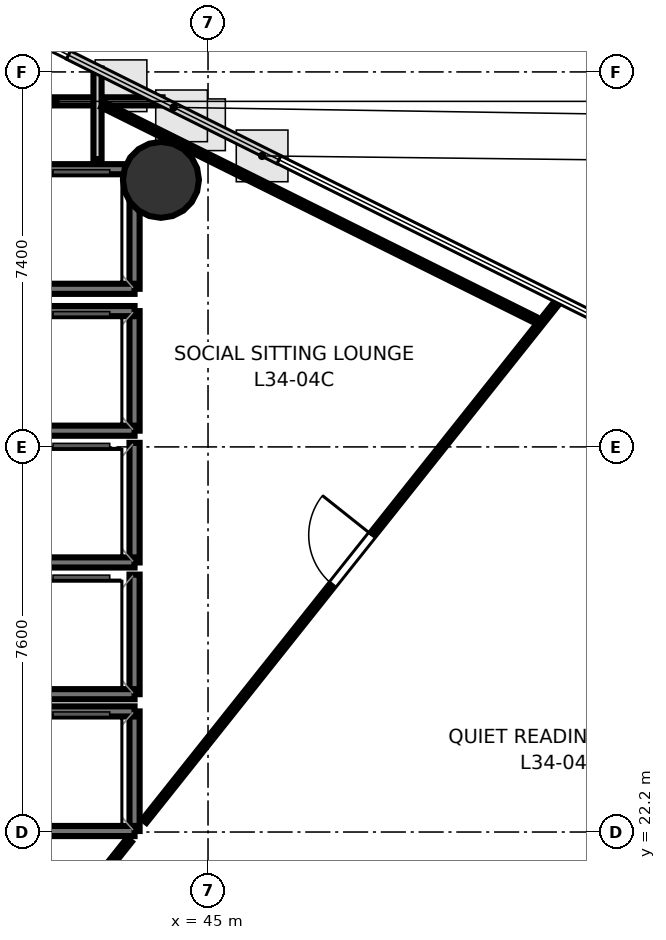
"""IFC4 building model, lengths in metres.
Left out: names, types, materials, properties, quantities, classifications, styles, units other than length and angle.
Written with IfcOpenShell. Run it as: python <this file> out.ifc"""

import sys

from ifc_helpers import new_model, si_unit, direction, frame, frame_2d, origin, origin_2d, place, context, subcontext, project, spatial, rectangle, hollow_circle, extrude, element, fill, save


model = new_model("IFC4")
c1 = context("Model", 3, precision=1e-05, world=origin(), true_north=direction((0.0, 1.0)))
c2 = subcontext(c1, "Body", "Model", "MODEL_VIEW")
j1 = project(units=[si_unit("LENGTHUNIT", "METRE"), si_unit("PLANEANGLEUNIT", "RADIAN")], contexts=[c1])
p1 = place(None, origin())
s1 = spatial("IfcSite", under=j1, at=p1, CompositionType="ELEMENT")
p2 = place(p1, origin())
s2 = spatial("IfcBuilding", under=s1, at=p2, CompositionType="ELEMENT")
p3 = place(p2, frame((0.0, 0.0, 134.8)))
s3 = spatial("IfcBuildingStorey", under=s2, at=p3, CompositionType="ELEMENT", Elevation=134.8)
p4 = place(p3, frame((44.071, 35.07, 0.0), z_axis=(0.0, 0.0, 1.0), x_axis=(1.0, 0.0, 0.0)))
e1 = element("IfcColumn", 1, at=p4, inside=s3, PredefinedType="COLUMN", context=c2, shape_type="SweptSolid", body=[
    extrude(hollow_circle(Radius=0.75, WallThickness=0.036, at=origin_2d()), origin(), (0.0, 0.0, 1.0), 3.7),
])
p5 = place(p3, frame((43.55, 30.12, 0.0), z_axis=(0.0, 0.0, 1.0), x_axis=(0.0, 1.0, 0.0)))
e2 = element("IfcWall", 2, at=p5, inside=s3, PredefinedType="SOLIDWALL", context=c2, shape_type="SweptSolid", body=[
    extrude(rectangle(XDim=2.36, YDim=0.2, at=frame_2d((1.18, 0.0))), origin(), (0.0, 0.0, 1.0), 3.4),
])
for number, where, z_axis, x_axis in (
    (3, (41.45, 32.48, 0.0), (0.0, 0.0, 1.0), (1.0, 0.0, 0.0)),
    (4, (41.45, 30.12, 0.0), (0.0, 0.0, 1.0), (1.0, 0.0, 0.0)),
):
    element("IfcWall", number, at=place(p3, frame(where, z_axis=z_axis, x_axis=x_axis)), inside=s3, PredefinedType="SOLIDWALL", context=c2, shape_type="SweptSolid", body=[
        extrude(rectangle(XDim=2.1, YDim=0.2, at=frame_2d((1.05, 0.0))), origin(), (0.0, 0.0, 1.0), 3.4),
    ])
p6 = place(p3, frame((43.55, 27.52, 0.0), z_axis=(0.0, 0.0, 1.0), x_axis=(0.0, 1.0, 0.0)))
e5 = element("IfcWall", 5, at=p6, inside=s3, PredefinedType="SOLIDWALL", context=c2, shape_type="SweptSolid", body=[
    extrude(rectangle(XDim=2.36, YDim=0.2, at=frame_2d((1.18, 0.0))), origin(), (0.0, 0.0, 1.0), 3.4),
])
p7 = place(p3, frame((41.45, 27.52, 0.0), z_axis=(0.0, 0.0, 1.0), x_axis=(1.0, 0.0, 0.0)))
e6 = element("IfcWall", 6, at=p7, inside=s3, PredefinedType="SOLIDWALL", context=c2, shape_type="SweptSolid", body=[
    extrude(rectangle(XDim=2.1, YDim=0.2, at=frame_2d((1.05, 0.0))), origin(), (0.0, 0.0, 1.0), 3.4),
])
p8 = place(p3, frame((43.55, 24.92, 0.0), z_axis=(0.0, 0.0, 1.0), x_axis=(0.0, 1.0, 0.0)))
e7 = element("IfcWall", 7, at=p8, inside=s3, PredefinedType="SOLIDWALL", context=c2, shape_type="SweptSolid", body=[
    extrude(rectangle(XDim=2.36, YDim=0.2, at=frame_2d((1.18, 0.0))), origin(), (0.0, 0.0, 1.0), 3.4),
])
p9 = place(p3, frame((41.45, 24.92, 0.0), z_axis=(0.0, 0.0, 1.0), x_axis=(1.0, 0.0, 0.0)))
e8 = element("IfcWall", 8, at=p9, inside=s3, PredefinedType="SOLIDWALL", context=c2, shape_type="SweptSolid", body=[
    extrude(rectangle(XDim=2.1, YDim=0.2, at=frame_2d((1.05, 0.0))), origin(), (0.0, 0.0, 1.0), 3.4),
])
p10 = place(p3, frame((43.55, 22.22, 0.0), z_axis=(0.0, 0.0, 1.0), x_axis=(0.0, 1.0, 0.0)))
e9 = element("IfcWall", 9, at=p10, inside=s3, PredefinedType="SOLIDWALL", context=c2, shape_type="SweptSolid", body=[
    extrude(rectangle(XDim=2.36, YDim=0.2, at=frame_2d((1.18, 0.0))), origin(), (0.0, 0.0, 1.0), 3.4),
])
for number, where, z_axis, x_axis in (
    (10, (41.45, 24.58, 0.0), (0.0, 0.0, 1.0), (1.0, 0.0, 0.0)),
    (11, (41.45, 22.22, 0.0), (0.0, 0.0, 1.0), (1.0, 0.0, 0.0)),
):
    element("IfcWall", number, at=place(p3, frame(where, z_axis=z_axis, x_axis=x_axis)), inside=s3, PredefinedType="SOLIDWALL", context=c2, shape_type="SweptSolid", body=[
        extrude(rectangle(XDim=2.1, YDim=0.2, at=frame_2d((1.05, 0.0))), origin(), (0.0, 0.0, 1.0), 3.4),
    ])
p11 = place(p3, frame((43.55, 32.92, 0.0), z_axis=(0.0, 0.0, 1.0), x_axis=(0.0, 1.0, 0.0)))
e12 = element("IfcWall", 12, at=p11, inside=s3, PredefinedType="SOLIDWALL", context=c2, shape_type="SweptSolid", body=[
    extrude(rectangle(XDim=2.36, YDim=0.2, at=frame_2d((1.18, 0.0))), origin(), (0.0, 0.0, 1.0), 3.4),
])
for number, where, z_axis, x_axis in (
    (13, (41.45, 35.28, 0.0), (0.0, 0.0, 1.0), (1.0, 0.0, 0.0)),
    (14, (41.45, 32.92, 0.0), (0.0, 0.0, 1.0), (1.0, 0.0, 0.0)),
):
    element("IfcWall", number, at=place(p3, frame(where, z_axis=z_axis, x_axis=x_axis)), inside=s3, PredefinedType="SOLIDWALL", context=c2, shape_type="SweptSolid", body=[
        extrude(rectangle(XDim=2.1, YDim=0.2, at=frame_2d((1.05, 0.0))), origin(), (0.0, 0.0, 1.0), 3.4),
    ])
p12 = place(p3, frame((39.88, 36.619, 0.0), z_axis=(0.0, 0.0, 1.0), x_axis=(1.0, 0.0, 0.0)))
e15 = element("IfcWall", 15, at=p12, inside=s3, PredefinedType="PARTITIONING", context=c2, shape_type="SweptSolid", body=[
    extrude(rectangle(XDim=4.223, YDim=0.16, at=frame_2d((2.111, 0.0))), origin(), (0.0, 0.0, 1.0), 2.72),
])
p13 = place(p3, frame((42.819, 37.267, 0.0), z_axis=(0.0, 0.0, 1.0), x_axis=(0.0, -1.0, 0.0)))
e16 = element("IfcWall", 16, at=p13, inside=s3, PredefinedType="PARTITIONING", context=c2, shape_type="SweptSolid", body=[
    extrude(rectangle(XDim=1.787, YDim=0.16, at=frame_2d((0.894, 0.0))), origin(), (0.0, 0.0, 1.0), 2.72),
])
p14 = place(p3, frame((40.304, 18.092, 0.0), z_axis=(0.0, 0.0, 1.0), x_axis=(0.622687180488, 0.782470878216, 0.0)))
e17 = element("IfcWall", 17, at=p14, inside=s3, PredefinedType="PARTITIONING", context=c2, shape_type="SweptSolid", body=[
    extrude(rectangle(XDim=5.047, YDim=0.12, at=frame_2d((2.523, 0.0))), origin(), (0.0, 0.0, 1.0), 2.72),
])
p15 = place(p3, frame((43.744, 22.414, 0.0), z_axis=(0.0, 0.0, 1.0), x_axis=(0.622689577397, 0.782468970759, 0.0)))
e18 = element("IfcWall", 18, at=p15, inside=s3, PredefinedType="PARTITIONING", context=c2, shape_type="SweptSolid", body=[
    extrude(rectangle(XDim=13.182, YDim=0.105, at=frame_2d((6.591, 0.0))), origin(), (0.0, 0.0, 1.0), 2.72),
])
p16 = place(p15, frame((5.966, 0.0, 0.0)))
e19 = element("IfcOpeningElement", 19, at=p16, cuts=e18, PredefinedType="OPENING", context=c2, shape_type="SweptSolid", body=[
    extrude(rectangle(XDim=1.25, YDim=2.2, at=frame_2d((0.625, 1.1))), frame((0.0, 0.062, 0.0), z_axis=(0.0, -1.0, 0.0), x_axis=(1.0, 0.0, 0.0)), (0.0, 0.0, 1.0), 0.125),
])
p17 = place(p3, frame((58.08, 21.61, 0.0), z_axis=(0.0, 0.0, 1.0), x_axis=(-0.916084106558, -0.400986171472, 0.0)))
e20 = element("IfcWall", 20, at=p17, inside=s3, PredefinedType="PARTITIONING", context=c2, shape_type="SweptSolid", body=[
    extrude(rectangle(XDim=14.082, YDim=0.105, at=frame_2d((7.041, 0.0))), origin(), (0.0, 0.0, 1.0), 2.72),
])
p18 = place(p3, frame((42.916, 36.556, 0.0), z_axis=(0.0, 0.0, 1.0), x_axis=(0.895450730662, -0.445160632758, 0.0)))
e21 = element("IfcWall", 21, at=p18, inside=s3, PredefinedType="PARTITIONING", context=c2, shape_type="SweptSolid", body=[
    extrude(rectangle(XDim=9.519, YDim=0.12, at=frame_2d((4.76, 0.0))), origin(), (0.0, 0.0, 1.0), 2.72),
])
p19 = place(p16, origin())
e22 = element("IfcDoor", 22, at=p19, inside=s3, OperationType="SINGLE_SWING_RIGHT", PredefinedType="DOOR", context=c2, shape_type="SweptSolid", body=[
    extrude(rectangle(XDim=1.25, YDim=2.2, at=frame_2d((0.625, 1.1))), frame((0.0, 0.025, 0.0), z_axis=(0.0, -1.0, 0.0), x_axis=(1.0, 0.0, 0.0)), (0.0, 0.0, 1.0), 0.05),
])
fill(e19, e22)
save(model, sys.argv[1])
